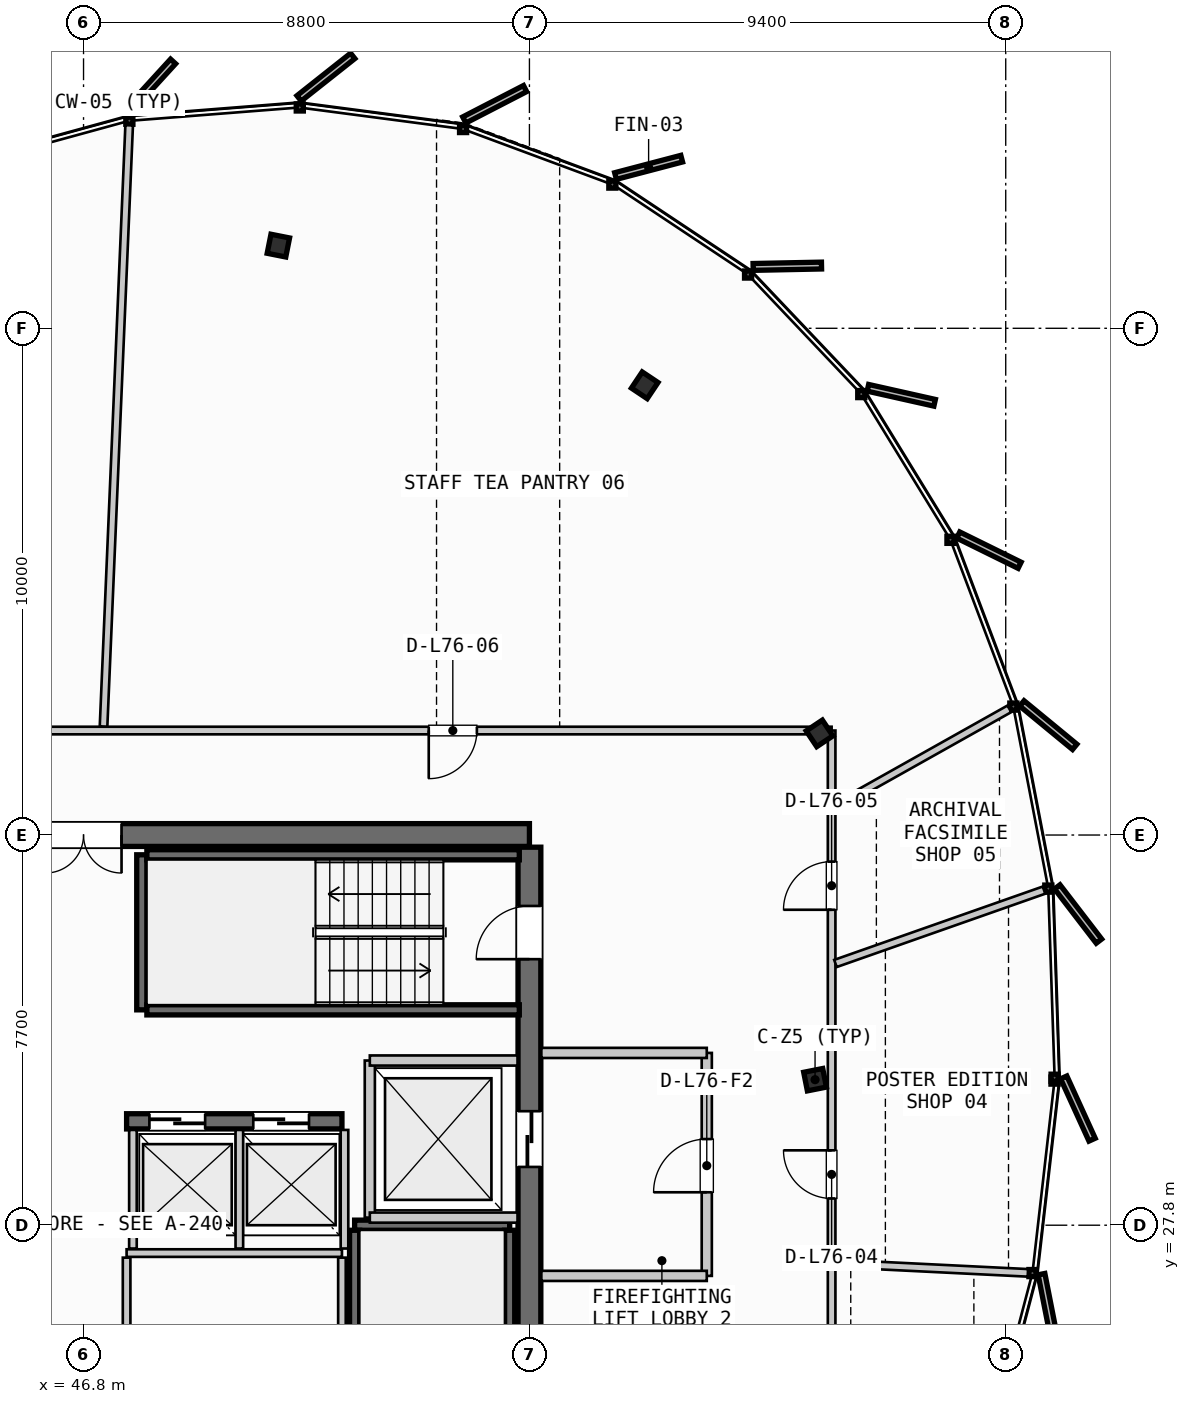
"""IFC4 building model, lengths in metres.
Left out: names, types, materials, properties, quantities, classifications, styles, units other than length and angle.
Written with IfcOpenShell. Run it as: python <this file> out.ifc"""

import sys

from ifc_helpers import new_model, si_unit, direction, frame, frame_2d, origin, origin_2d, place, context, subcontext, project, spatial, rectangle, i_section, extrude, source, transform, mapped, element, fill, save


model = new_model("IFC4")
c1 = context("Model", 3, precision=1e-05, world=origin(), true_north=direction((0.0, 1.0)))
c2 = subcontext(c1, "Body", "Model", "MODEL_VIEW")
j1 = project(units=[si_unit("LENGTHUNIT", "METRE"), si_unit("PLANEANGLEUNIT", "RADIAN")], contexts=[c1])
p1 = place(None, origin())
s1 = spatial("IfcSite", under=j1, at=p1, CompositionType="ELEMENT")
p2 = place(p1, origin())
s2 = spatial("IfcBuilding", under=s1, at=p2, CompositionType="ELEMENT")
p3 = place(p2, frame((0.0, 0.0, 287.05)))
s3 = spatial("IfcBuildingStorey", under=s2, at=p3, CompositionType="ELEMENT", Elevation=287.05)
p4 = place(p3, frame((55.6, 35.5, 0.0), z_axis=(0.0, 0.0, 1.0), x_axis=(-1.0, 0.0, 0.0)))
e1 = element("IfcWall", 1, at=p4, inside=s3, PredefinedType="SHEAR", context=c2, shape_type="SweptSolid", body=[
    extrude(rectangle(XDim=17.6, YDim=0.45, at=frame_2d((8.8, 0.0))), origin(), (0.0, 0.0, 1.0), 3.21),
])
p5 = place(p4, frame((8.05, 0.0, 0.0)))
e2 = element("IfcOpeningElement", 2, at=p5, cuts=e1, PredefinedType="OPENING", context=c2, shape_type="SweptSolid", body=[
    extrude(rectangle(XDim=1.5, YDim=2.2, at=frame_2d((0.75, 1.1))), frame((0.0, 0.235, 0.0), z_axis=(0.0, -1.0, 0.0), x_axis=(1.0, 0.0, 0.0)), (0.0, 0.0, 1.0), 0.47),
])
p6 = place(p4, frame((15.1, 0.0, 0.0)))
e3 = element("IfcOpeningElement", 3, at=p6, cuts=e1, PredefinedType="OPENING", context=c2, shape_type="SweptSolid", body=[
    extrude(rectangle(XDim=0.95, YDim=2.15, at=frame_2d((0.475, 1.075))), frame((0.0, 0.235, 0.0), z_axis=(0.0, -1.0, 0.0), x_axis=(1.0, 0.0, 0.0)), (0.0, 0.0, 1.0), 0.47),
])
p7 = place(p4, frame((12.6, 0.0, 0.0)))
e4 = element("IfcOpeningElement", 4, at=p7, cuts=e1, PredefinedType="OPENING", context=c2, shape_type="SweptSolid", body=[
    extrude(rectangle(XDim=0.95, YDim=2.15, at=frame_2d((0.475, 1.075))), frame((0.0, 0.235, 0.0), z_axis=(0.0, -1.0, 0.0), x_axis=(1.0, 0.0, 0.0)), (0.0, 0.0, 1.0), 0.47),
])
p8 = place(p4, frame((10.45, 0.0, 0.0)))
e5 = element("IfcOpeningElement", 5, at=p8, cuts=e1, PredefinedType="OPENING", context=c2, shape_type="SweptSolid", body=[
    extrude(rectangle(XDim=0.95, YDim=2.15, at=frame_2d((0.475, 1.075))), frame((0.0, 0.235, 0.0), z_axis=(0.0, -1.0, 0.0), x_axis=(1.0, 0.0, 0.0)), (0.0, 0.0, 1.0), 0.47),
])
p9 = place(p3, frame((55.6, 20.34, 0.0), z_axis=(0.0, 0.0, 1.0), x_axis=(0.0, 1.0, 0.0)))
e6 = element("IfcWall", 6, at=p9, inside=s3, PredefinedType="SHEAR", context=c2, shape_type="SweptSolid", body=[
    extrude(rectangle(XDim=14.92, YDim=0.45, at=frame_2d((7.46, 0.0))), origin(), (0.0, 0.0, 1.0), 3.21),
])
p10 = place(p9, frame((12.71, 0.0, 0.0)))
e7 = element("IfcOpeningElement", 7, at=p10, cuts=e6, PredefinedType="OPENING", context=c2, shape_type="SweptSolid", body=[
    extrude(rectangle(XDim=1.05, YDim=2.15, at=frame_2d((0.525, 1.075))), frame((0.0, 0.235, 0.0), z_axis=(0.0, -1.0, 0.0), x_axis=(1.0, 0.0, 0.0)), (0.0, 0.0, 1.0), 0.47),
])
p11 = place(p9, frame((8.61, 0.0, 0.0)))
e8 = element("IfcOpeningElement", 8, at=p11, cuts=e6, PredefinedType="OPENING", context=c2, shape_type="SweptSolid", body=[
    extrude(rectangle(XDim=1.1, YDim=2.2, at=frame_2d((0.55, 1.1))), frame((0.0, 0.235, 0.0), z_axis=(0.0, -1.0, 0.0), x_axis=(1.0, 0.0, 0.0)), (0.0, 0.0, 1.0), 0.47),
])
p12 = place(p3, frame((47.65, 29.85, 0.0), z_axis=(0.0, 0.0, 1.0), x_axis=(1.0, 0.0, 0.0)))
e9 = element("IfcWall", 9, at=p12, inside=s3, PredefinedType="SHEAR", context=c2, shape_type="SweptSolid", body=[
    extrude(rectangle(XDim=4.25, YDim=0.3, at=frame_2d((2.125, 0.0))), origin(), (0.0, 0.0, 1.0), 3.21),
])
p13 = place(p12, frame((0.45, 0.0, 0.0)))
e10 = element("IfcOpeningElement", 10, at=p13, cuts=e9, PredefinedType="OPENING", context=c2, shape_type="SweptSolid", body=[
    extrude(rectangle(XDim=1.1, YDim=2.2, at=frame_2d((0.55, 1.1))), frame((0.0, 0.16, 0.0), z_axis=(0.0, -1.0, 0.0), x_axis=(1.0, 0.0, 0.0)), (0.0, 0.0, 1.0), 0.32),
])
p14 = place(p12, frame((2.5, 0.0, 0.0)))
e11 = element("IfcOpeningElement", 11, at=p14, cuts=e9, PredefinedType="OPENING", context=c2, shape_type="SweptSolid", body=[
    extrude(rectangle(XDim=1.1, YDim=2.2, at=frame_2d((0.55, 1.1))), frame((0.0, 0.16, 0.0), z_axis=(0.0, -1.0, 0.0), x_axis=(1.0, 0.0, 0.0)), (0.0, 0.0, 1.0), 0.32),
])
m1 = source(origin(), c2, "Body", "SweptSolid", [
    extrude(i_section(OverallWidth=0.374, OverallDepth=0.383, WebThickness=0.017, FlangeThickness=0.026, FilletRadius=0.015, at=origin_2d()), origin(), (0.0, 0.0, 1.0), 3.21),
])
for number, where, z_axis, x_axis in (
    (12, (61.237, 30.672, 0.0), (0.0, 0.0, 1.0), (0.981, 0.195, 0.0)),
    (13, (61.326, 37.506, 0.0), (0.0, 0.0, 1.0), (0.831, 0.556, 0.0)),
    (14, (57.875, 44.375, 0.0), (0.0, 0.0, 1.0), (0.556, 0.831, 0.0)),
    (15, (50.645, 47.132, 0.0), (0.0, 0.0, 1.0), (0.195, 0.981, 0.0)),
):
    element("IfcColumn", number, at=place(p3, frame(where, z_axis=z_axis, x_axis=x_axis)), inside=s3, PredefinedType="COLUMN", context=c2, shape_type="MappedRepresentation", body=[
        mapped(m1, transform((0.0, 0.0, 0.0), scale=1.0)),
    ])
p15 = place(p3, frame((52.15, 27.8, 0.0), z_axis=(0.0, 0.0, 1.0), x_axis=(1.0, 0.0, 0.0)))
e16 = element("IfcWall", 16, at=p15, inside=s3, PredefinedType="SHEAR", context=c2, shape_type="SweptSolid", body=[
    extrude(rectangle(XDim=3.06, YDim=0.2, at=frame_2d((1.53, 0.0))), origin(), (0.0, 0.0, 1.0), 3.21),
])
for number, where, z_axis, x_axis in (
    (17, (55.21, 27.7, 0.0), (0.0, 0.0, 1.0), (0.0, -1.0, 0.0)),
    (18, (52.15, 20.35, 0.0), (0.0, 0.0, 1.0), (0.0, 1.0, 0.0)),
):
    element("IfcWall", number, at=place(p3, frame(where, z_axis=z_axis, x_axis=x_axis)), inside=s3, PredefinedType="SHEAR", context=c2, shape_type="SweptSolid", body=[
        extrude(rectangle(XDim=7.35, YDim=0.2, at=frame_2d((3.675, 0.0))), origin(), (0.0, 0.0, 1.0), 3.21),
    ])
p16 = place(p3, frame((47.95, 32.05, 0.0), z_axis=(0.0, 0.0, 1.0), x_axis=(0.0, 1.0, 0.0)))
e19 = element("IfcWall", 19, at=p16, inside=s3, PredefinedType="SHEAR", context=c2, shape_type="SweptSolid", body=[
    extrude(rectangle(XDim=3.06, YDim=0.2, at=frame_2d((1.53, 0.0))), origin(), (0.0, 0.0, 1.0), 3.21),
])
for number, where, z_axis, x_axis in (
    (20, (48.05, 35.11, 0.0), (0.0, 0.0, 1.0), (1.0, 0.0, 0.0)),
    (21, (55.4, 32.05, 0.0), (0.0, 0.0, 1.0), (-1.0, 0.0, 0.0)),
):
    element("IfcWall", number, at=place(p3, frame(where, z_axis=z_axis, x_axis=x_axis)), inside=s3, PredefinedType="SHEAR", context=c2, shape_type="SweptSolid", body=[
        extrude(rectangle(XDim=7.35, YDim=0.2, at=frame_2d((3.675, 0.0))), origin(), (0.0, 0.0, 1.0), 3.21),
    ])
p17 = place(p3, frame((52.45, 27.95, 0.0), z_axis=(0.0, 0.0, 1.0), x_axis=(0.0, 1.0, 0.0)))
e22 = element("IfcWall", 22, at=p17, inside=s3, PredefinedType="PARTITIONING", context=c2, shape_type="SweptSolid", body=[
    extrude(rectangle(XDim=3.1, YDim=0.2, at=frame_2d((1.55, 0.0))), origin(), (0.0, 0.0, 1.0), 2.315),
])
for number, where, z_axis, x_axis in (
    (23, (52.45, 27.95, 0.0), (0.0, 0.0, 1.0), (1.0, 0.0, 0.0)),
    (24, (52.45, 31.05, 0.0), (0.0, 0.0, 1.0), (1.0, 0.0, 0.0)),
):
    element("IfcWall", number, at=place(p3, frame(where, z_axis=z_axis, x_axis=x_axis)), inside=s3, PredefinedType="PARTITIONING", context=c2, shape_type="SweptSolid", body=[
        extrude(rectangle(XDim=2.915, YDim=0.2, at=frame_2d((1.458, 0.0))), origin(), (0.0, 0.0, 1.0), 2.315),
    ])
p18 = place(p3, frame((59.1, 26.8, 0.0), z_axis=(0.0, 0.0, 1.0), x_axis=(0.0, 1.0, 0.0)))
e25 = element("IfcWall", 25, at=p18, inside=s3, PredefinedType="PARTITIONING", context=c2, shape_type="SweptSolid", body=[
    extrude(rectangle(XDim=4.4, YDim=0.2, at=frame_2d((2.2, 0.0))), origin(), (0.0, 0.0, 1.0), 2.315),
])
p19 = place(p18, frame((1.65, 0.0, 0.0)))
e26 = element("IfcOpeningElement", 26, at=p19, cuts=e25, PredefinedType="OPENING", context=c2, shape_type="SweptSolid", body=[
    extrude(rectangle(XDim=1.05, YDim=2.15, at=frame_2d((0.525, 1.075))), frame((0.0, 0.11, 0.0), z_axis=(0.0, -1.0, 0.0), x_axis=(1.0, 0.0, 0.0)), (0.0, 0.0, 1.0), 0.22),
])
for number, where, z_axis, x_axis in (
    (27, (55.835, 26.8, 0.0), (0.0, 0.0, 1.0), (1.0, 0.0, 0.0)),
    (28, (55.835, 31.2, 0.0), (0.0, 0.0, 1.0), (1.0, 0.0, 0.0)),
):
    element("IfcWall", number, at=place(p3, frame(where, z_axis=z_axis, x_axis=x_axis)), inside=s3, PredefinedType="PARTITIONING", context=c2, shape_type="SweptSolid", body=[
        extrude(rectangle(XDim=3.265, YDim=0.2, at=frame_2d((1.633, 0.0))), origin(), (0.0, 0.0, 1.0), 2.315),
    ])
p20 = place(p3, frame((47.65, 27.25, 0.0), z_axis=(0.0, 0.0, 1.0), x_axis=(1.0, 0.0, 0.0)))
e29 = element("IfcWall", 29, at=p20, inside=s3, PredefinedType="PARTITIONING", context=c2, shape_type="SweptSolid", body=[
    extrude(rectangle(XDim=4.25, YDim=0.15, at=frame_2d((2.125, 0.0))), origin(), (0.0, 0.0, 1.0), 2.315),
])
for number, where, z_axis, x_axis in (
    (30, (47.65, 24.92, 0.0), (0.0, 0.0, 1.0), (0.0, 1.0, 0.0)),
    (31, (51.9, 24.92, 0.0), (0.0, 0.0, 1.0), (0.0, 1.0, 0.0)),
):
    element("IfcWall", number, at=place(p3, frame(where, z_axis=z_axis, x_axis=x_axis)), inside=s3, PredefinedType="PARTITIONING", context=c2, shape_type="SweptSolid", body=[
        extrude(rectangle(XDim=2.24, YDim=0.15, at=frame_2d((1.12, 0.0))), origin(), (0.0, 0.0, 1.0), 2.315),
    ])
for number, where, z_axis, x_axis in (
    (32, (47.775, 27.34, 0.0), (0.0, 0.0, 1.0), (0.0, 1.0, 0.0)),
    (33, (49.875, 27.34, 0.0), (0.0, 0.0, 1.0), (0.0, 1.0, 0.0)),
    (34, (51.95, 27.34, 0.0), (0.0, 0.0, 1.0), (0.0, 1.0, 0.0)),
):
    element("IfcWall", number, at=place(p3, frame(where, z_axis=z_axis, x_axis=x_axis)), inside=s3, PredefinedType="PARTITIONING", context=c2, shape_type="SweptSolid", body=[
        extrude(rectangle(XDim=2.34, YDim=0.15, at=frame_2d((1.17, 0.0))), origin(), (0.0, 0.0, 1.0), 2.315),
    ])
p21 = place(p3, frame((61.564, 18.269, 0.0), z_axis=(0.0, 0.0, 1.0), x_axis=(0.0, 1.0, 0.0)))
e35 = element("IfcWall", 35, at=p21, inside=s3, PredefinedType="PARTITIONING", context=c2, shape_type="SweptSolid", body=[
    extrude(rectangle(XDim=19.293, YDim=0.15, at=frame_2d((9.646, 0.0))), origin(), (0.0, 0.0, 1.0), 2.315),
])
p22 = place(p21, frame((4.903, 0.0, 0.0)))
e36 = element("IfcOpeningElement", 36, at=p22, cuts=e35, PredefinedType="OPENING", context=c2, shape_type="SweptSolid", body=[
    extrude(rectangle(XDim=0.95, YDim=2.15, at=frame_2d((0.475, 1.075))), frame((0.0, 0.085, 0.0), z_axis=(0.0, -1.0, 0.0), x_axis=(1.0, 0.0, 0.0)), (0.0, 0.0, 1.0), 0.17),
])
p23 = place(p21, frame((10.059, 0.0, 0.0)))
e37 = element("IfcOpeningElement", 37, at=p23, cuts=e35, PredefinedType="OPENING", context=c2, shape_type="SweptSolid", body=[
    extrude(rectangle(XDim=0.95, YDim=2.15, at=frame_2d((0.475, 1.075))), frame((0.0, 0.085, 0.0), z_axis=(0.0, -1.0, 0.0), x_axis=(1.0, 0.0, 0.0)), (0.0, 0.0, 1.0), 0.17),
])
p24 = place(p21, frame((15.756, 0.0, 0.0)))
e38 = element("IfcOpeningElement", 38, at=p24, cuts=e35, PredefinedType="OPENING", context=c2, shape_type="SweptSolid", body=[
    extrude(rectangle(XDim=0.95, YDim=2.15, at=frame_2d((0.475, 1.075))), frame((0.0, 0.085, 0.0), z_axis=(0.0, -1.0, 0.0), x_axis=(1.0, 0.0, 0.0)), (0.0, 0.0, 1.0), 0.17),
])
p25 = place(p3, frame((61.564, 37.562, 0.0), z_axis=(0.0, 0.0, 1.0), x_axis=(-1.0, 0.0, 0.0)))
e39 = element("IfcWall", 39, at=p25, inside=s3, PredefinedType="PARTITIONING", context=c2, shape_type="SweptSolid", body=[
    extrude(rectangle(XDim=30.274, YDim=0.15, at=frame_2d((15.137, 0.0))), origin(), (0.0, 0.0, 1.0), 2.315),
])
p26 = place(p25, frame((7.001, 0.0, 0.0)))
e40 = element("IfcOpeningElement", 40, at=p26, cuts=e39, PredefinedType="OPENING", context=c2, shape_type="SweptSolid", body=[
    extrude(rectangle(XDim=0.95, YDim=2.15, at=frame_2d((0.475, 1.075))), frame((0.0, 0.085, 0.0), z_axis=(0.0, -1.0, 0.0), x_axis=(1.0, 0.0, 0.0)), (0.0, 0.0, 1.0), 0.17),
])
p27 = place(p25, frame((21.558, 0.0, 0.0)))
e41 = element("IfcOpeningElement", 41, at=p27, cuts=e39, PredefinedType="OPENING", context=c2, shape_type="SweptSolid", body=[
    extrude(rectangle(XDim=0.95, YDim=2.15, at=frame_2d((0.475, 1.075))), frame((0.0, 0.085, 0.0), z_axis=(0.0, -1.0, 0.0), x_axis=(1.0, 0.0, 0.0)), (0.0, 0.0, 1.0), 0.17),
])
p28 = place(p3, frame((61.644, 27.046, 0.0), z_axis=(0.0, 0.0, 1.0), x_axis=(0.998790354341, -0.049171415218, 0.0)))
e42 = element("IfcWall", 42, at=p28, inside=s3, PredefinedType="PARTITIONING", context=c2, shape_type="SweptSolid", body=[
    extrude(rectangle(XDim=3.798, YDim=0.15, at=frame_2d((1.899, 0.0))), origin(), (0.0, 0.0, 1.0), 2.315),
])
p29 = place(p3, frame((61.639, 32.965, 0.0), z_axis=(0.0, 0.0, 1.0), x_axis=(0.943392491145, 0.331678470287, 0.0)))
e43 = element("IfcWall", 43, at=p29, inside=s3, PredefinedType="PARTITIONING", context=c2, shape_type="SweptSolid", body=[
    extrude(rectangle(XDim=4.364, YDim=0.15, at=frame_2d((2.182, 0.0))), origin(), (0.0, 0.0, 1.0), 2.315),
])
p30 = place(p3, frame((61.634, 36.06, 0.0), z_axis=(0.0, 0.0, 1.0), x_axis=(0.871963846329, 0.489570271457, 0.0)))
e44 = element("IfcWall", 44, at=p30, inside=s3, PredefinedType="PARTITIONING", context=c2, shape_type="SweptSolid", body=[
    extrude(rectangle(XDim=3.943, YDim=0.15, at=frame_2d((1.972, 0.0))), origin(), (0.0, 0.0, 1.0), 2.315),
])
p31 = place(p3, frame((47.195, 37.642, 0.0), z_axis=(0.0, 0.0, 1.0), x_axis=(0.042599425982, 0.999092232432, 0.0)))
e45 = element("IfcWall", 45, at=p31, inside=s3, PredefinedType="PARTITIONING", context=c2, shape_type="SweptSolid", body=[
    extrude(rectangle(XDim=11.875, YDim=0.15, at=frame_2d((5.938, 0.0))), origin(), (0.0, 0.0, 1.0), 2.315),
])
m2 = source(origin(), c2, "Body", "SweptSolid", [
    extrude(rectangle(XDim=1.05, YDim=2.15, at=frame_2d((0.525, 1.075))), frame((0.0, 0.025, 0.0), z_axis=(0.0, -1.0, 0.0), x_axis=(1.0, 0.0, 0.0)), (0.0, 0.0, 1.0), 0.05),
])
p32 = place(p10, origin())
e46 = element("IfcDoor", 46, at=p32, inside=s3, OperationType="SINGLE_SWING_LEFT", PredefinedType="DOOR", context=c2, shape_type="MappedRepresentation", body=[
    mapped(m2, transform((0.0, 0.0, 0.0), scale=1.0)),
])
fill(e7, e46)
m3 = source(origin(), c2, "Body", "SweptSolid", [
    extrude(rectangle(XDim=1.5, YDim=2.2, at=frame_2d((0.75, 1.1))), frame((0.0, 0.025, 0.0), z_axis=(0.0, -1.0, 0.0), x_axis=(1.0, 0.0, 0.0)), (0.0, 0.0, 1.0), 0.05),
])
p33 = place(p5, origin())
e47 = element("IfcDoor", 47, at=p33, inside=s3, OperationType="DOUBLE_DOOR_SINGLE_SWING", PredefinedType="DOOR", context=c2, shape_type="MappedRepresentation", body=[
    mapped(m3, transform((0.0, 0.0, 0.0), scale=1.0)),
])
fill(e2, e47)
m4 = source(origin(), c2, "Body", "SweptSolid", [
    extrude(rectangle(XDim=1.1, YDim=2.2, at=frame_2d((0.55, 1.1))), frame((0.0, 0.025, 0.0), z_axis=(0.0, -1.0, 0.0), x_axis=(1.0, 0.0, 0.0)), (0.0, 0.0, 1.0), 0.05),
])
p34 = place(p11, origin())
e48 = element("IfcDoor", 48, at=p34, inside=s3, OperationType="SLIDING_TO_RIGHT", PredefinedType="DOOR", context=c2, shape_type="MappedRepresentation", body=[
    mapped(m4, transform((0.0, 0.0, 0.0), scale=1.0)),
])
fill(e8, e48)
p35 = place(p13, origin())
e49 = element("IfcDoor", 49, at=p35, inside=s3, OperationType="SLIDING_TO_LEFT", PredefinedType="DOOR", context=c2, shape_type="MappedRepresentation", body=[
    mapped(m4, transform((0.0, 0.0, 0.0), scale=1.0)),
])
fill(e10, e49)
p36 = place(p14, origin())
e50 = element("IfcDoor", 50, at=p36, inside=s3, OperationType="SLIDING_TO_LEFT", PredefinedType="DOOR", context=c2, shape_type="MappedRepresentation", body=[
    mapped(m4, transform((0.0, 0.0, 0.0), scale=1.0)),
])
fill(e11, e50)
p37 = place(p19, origin())
e51 = element("IfcDoor", 51, at=p37, inside=s3, OperationType="SINGLE_SWING_LEFT", PredefinedType="DOOR", context=c2, shape_type="MappedRepresentation", body=[
    mapped(m2, transform((0.0, 0.0, 0.0), scale=1.0)),
])
fill(e26, e51)
m5 = source(origin(), c2, "Body", "SweptSolid", [
    extrude(rectangle(XDim=0.95, YDim=2.15, at=frame_2d((0.475, 1.075))), frame((0.0, 0.025, 0.0), z_axis=(0.0, -1.0, 0.0), x_axis=(1.0, 0.0, 0.0)), (0.0, 0.0, 1.0), 0.05),
])
p38 = place(p23, origin())
e52 = element("IfcDoor", 52, at=p38, inside=s3, OperationType="SINGLE_SWING_RIGHT", PredefinedType="DOOR", context=c2, shape_type="MappedRepresentation", body=[
    mapped(m5, transform((0.0, 0.0, 0.0), scale=1.0)),
])
fill(e37, e52)
p39 = place(p24, origin())
e53 = element("IfcDoor", 53, at=p39, inside=s3, OperationType="SINGLE_SWING_LEFT", PredefinedType="DOOR", context=c2, shape_type="MappedRepresentation", body=[
    mapped(m5, transform((0.0, 0.0, 0.0), scale=1.0)),
])
fill(e38, e53)
p40 = place(p26, origin())
e54 = element("IfcDoor", 54, at=p40, inside=s3, OperationType="SINGLE_SWING_RIGHT", PredefinedType="DOOR", context=c2, shape_type="MappedRepresentation", body=[
    mapped(m5, transform((0.0, 0.0, 0.0), scale=1.0)),
])
fill(e40, e54)
save(model, sys.argv[1])
